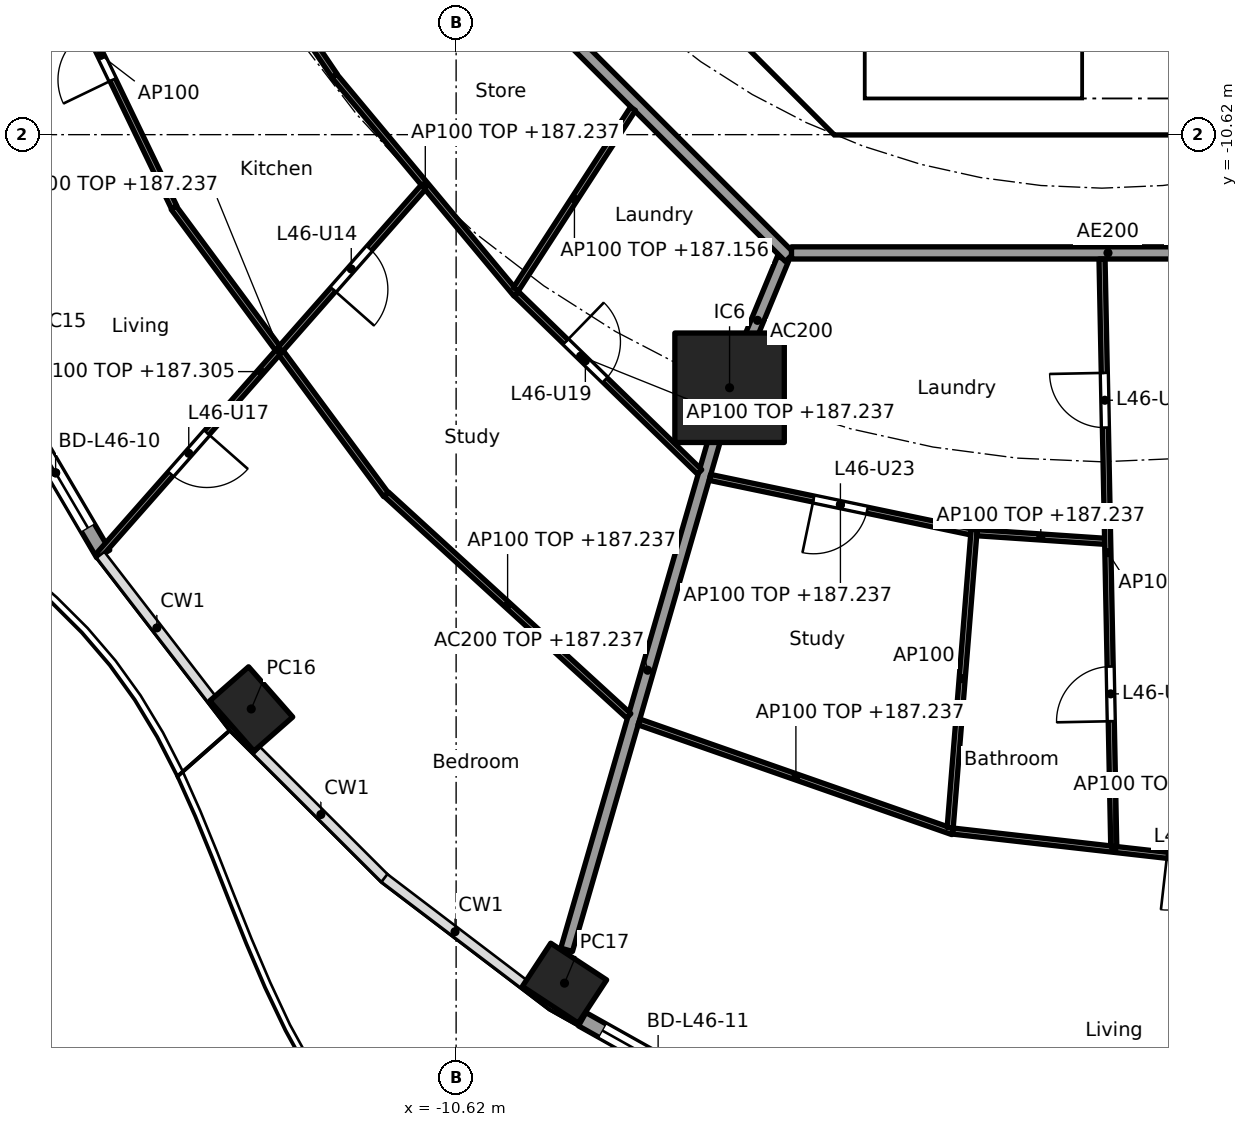
"""IFC4 building model, lengths in metres.
Left out: names, types, materials, properties, quantities, classifications, styles, units other than length and angle.
Written with IfcOpenShell. Run it as: python <this file> out.ifc"""

import sys

from ifc_helpers import new_model, si_unit, direction, frame, frame_2d, origin, origin_2d, place, context, subcontext, project, spatial, polyline, rectangle, hollow_rectangle, outline, extrude, element, fill, save


model = new_model("IFC4")
c1 = context("Model", 3, precision=1e-05, world=origin(), true_north=direction((0.0, 1.0)))
c2 = subcontext(c1, "Body", "Model", "MODEL_VIEW")
j1 = project(units=[si_unit("LENGTHUNIT", "METRE"), si_unit("PLANEANGLEUNIT", "RADIAN")], contexts=[c1])
p1 = place(None, origin())
s1 = spatial("IfcSite", under=j1, at=p1, CompositionType="ELEMENT")
p2 = place(p1, origin())
s2 = spatial("IfcBuilding", under=s1, at=p2, CompositionType="ELEMENT")
p3 = place(p2, frame((0.0, 0.0, 184.4)))
s3 = spatial("IfcBuildingStorey", under=s2, at=p3, CompositionType="ELEMENT", Elevation=184.4)
for number, where, z_axis, x_axis in (
    (1, (-13.989, -20.064, 0.0), (0.0, 0.0, 1.0), (0.66, -0.751, 0.0)),
    (2, (-8.837, -24.573, 0.0), (0.0, 0.0, 1.0), (0.836, -0.549, 0.0)),
):
    element("IfcColumn", number, at=place(p3, frame(where, z_axis=z_axis, x_axis=x_axis)), inside=s3, PredefinedType="COLUMN", context=c2, shape_type="SweptSolid", body=[
        extrude(hollow_rectangle(XDim=1.1, YDim=0.85, WallThickness=0.036, at=origin_2d()), origin(), (0.0, 0.0, 1.0), 3.7),
    ])
p4 = place(p3, frame((-6.123, -14.782, 0.0), z_axis=(0.0, 0.0, 1.0), x_axis=(1.0, 0.0, 0.0)))
e3 = element("IfcColumn", 3, at=p4, inside=s3, PredefinedType="COLUMN", context=c2, shape_type="SweptSolid", body=[
    extrude(rectangle(XDim=1.8, YDim=1.8, at=origin_2d()), origin(), (0.0, 0.0, 1.0), 3.7),
])
p5 = place(p3, frame((-16.424, -17.515, 0.0), z_axis=(0.0, 0.0, 1.0), x_axis=(-0.506309086483, 0.862352079458, 0.0)))
e4 = element("IfcWall", 4, at=p5, inside=s3, PredefinedType="SOLIDWALL", context=c2, shape_type="SweptSolid", body=[
    extrude(rectangle(XDim=3.092, YDim=0.25, at=frame_2d((1.546, 0.0))), origin(), (0.0, 0.0, 1.0), 3.44),
])
p6 = place(p5, frame((0.496, 0.0, 0.0)))
e5 = element("IfcOpeningElement", 5, at=p6, cuts=e4, PredefinedType="OPENING", context=c2, shape_type="SweptSolid", body=[
    extrude(rectangle(XDim=2.1, YDim=2.4, at=frame_2d((1.05, 1.2))), frame((0.0, 0.135, 0.0), z_axis=(0.0, -1.0, 0.0), x_axis=(1.0, 0.0, 0.0)), (0.0, 0.0, 1.0), 0.27),
])
p7 = place(p3, frame((-6.049, -26.568, 0.0), z_axis=(0.0, 0.0, 1.0), x_axis=(-0.872078262455, 0.489366431371, 0.0)))
e6 = element("IfcWall", 6, at=p7, inside=s3, PredefinedType="SOLIDWALL", context=c2, shape_type="SweptSolid", body=[
    extrude(rectangle(XDim=2.864, YDim=0.25, at=frame_2d((1.432, 0.0))), origin(), (0.0, 0.0, 1.0), 3.44),
])
p8 = place(p7, frame((0.382, 0.0, 0.0)))
e7 = element("IfcOpeningElement", 7, at=p8, cuts=e6, PredefinedType="OPENING", context=c2, shape_type="SweptSolid", body=[
    extrude(rectangle(XDim=2.1, YDim=2.4, at=frame_2d((1.05, 1.2))), frame((0.0, 0.135, 0.0), z_axis=(0.0, -1.0, 0.0), x_axis=(1.0, 0.0, 0.0)), (0.0, 0.0, 1.0), 0.27),
])
p9 = place(p3, frame((-9.988, -4.613, 0.0), z_axis=(0.0, 0.0, 1.0), x_axis=(0.707106781187, -0.707106781187, 0.0)))
e8 = element("IfcWall", 8, at=p9, inside=s3, PredefinedType="SHEAR", context=c2, shape_type="SweptSolid", body=[
    extrude(rectangle(XDim=7.602, YDim=0.6, at=frame_2d((3.801, 0.0))), origin(), (0.0, 0.0, 1.0), 3.44),
])
p10 = place(p9, frame((6.151, 0.0, 0.0)))
e9 = element("IfcOpeningElement", 9, at=p10, cuts=e8, PredefinedType="OPENING", context=c2, shape_type="SweptSolid", body=[
    extrude(rectangle(XDim=1.1, YDim=2.1, at=frame_2d((0.55, 1.05))), frame((0.0, 0.31, 0.0), z_axis=(0.0, -1.0, 0.0), x_axis=(1.0, 0.0, 0.0)), (0.0, 0.0, 1.0), 0.62),
])
p11 = place(p3, origin())
e10 = element("IfcWall", 10, at=p11, inside=s3, PredefinedType="SHEAR", context=c2, shape_type="SweptSolid", body=[
    extrude(outline(polyline([(-4.152, -10.025), (4.152, -10.025), (4.401, -9.776), (4.825, -10.2), (4.401, -10.625), (-4.401, -10.625), (-4.825, -10.2), (-4.401, -9.776), (-4.152, -10.025)])), origin(), (0.0, 0.0, 1.0), 3.44),
])
p12 = place(p3, origin())
e11 = element("IfcWall", 11, at=p12, inside=s3, PredefinedType="SOLIDWALL", context=c2, shape_type="SweptSolid", body=[
    extrude(outline(polyline([(-3.9, -10.025), (-4.1, -10.025), (-4.1, -7.025), (-3.9, -7.025), (-3.9, -10.025)])), origin(), (0.0, 0.0, 1.0), 3.44),
])
p13 = place(p3, frame((-5.243, -12.657, 0.0), z_axis=(0.0, 0.0, 1.0), x_axis=(-0.382707856524, -0.923869415315, 0.0)))
e12 = element("IfcWall", 12, at=p13, inside=s3, PredefinedType="PARTITIONING", context=c2, shape_type="SweptSolid", body=[
    extrude(rectangle(XDim=2.2, YDim=0.2, at=frame_2d((1.1, 0.0))), origin(), (0.0, 0.0, 1.0), 3.44),
])
p14 = place(p3, frame((-6.137, -14.83, 0.0), z_axis=(0.0, 0.0, 1.0), x_axis=(-0.278461169897, -0.96044748782, 0.0)))
e13 = element("IfcWall", 13, at=p14, inside=s3, PredefinedType="PARTITIONING", context=c2, shape_type="SweptSolid", body=[
    extrude(rectangle(XDim=9.573, YDim=0.2, at=frame_2d((4.787, 0.0))), origin(), (0.0, 0.0, 1.0), 2.837),
])
p15 = place(p3, frame((-12.635, -5.134, 0.0), z_axis=(0.0, 0.0, 1.0), x_axis=(0.707106781187, -0.707106781187, 0.0)))
e14 = element("IfcWall", 14, at=p15, inside=s3, PredefinedType="PARTITIONING", context=c2, shape_type="SweptSolid", body=[
    extrude(rectangle(XDim=10.609, YDim=0.2, at=frame_2d((5.305, 0.0))), origin(), (0.0, 0.0, 1.0), 3.44),
])
p16 = place(p3, frame((-5.104, -12.565, 0.0), z_axis=(0.0, 0.0, 1.0), x_axis=(1.0, 0.0, 0.0)))
e15 = element("IfcWall", 15, at=p16, inside=s3, PredefinedType="PARTITIONING", context=c2, shape_type="SweptSolid", body=[
    extrude(rectangle(XDim=10.409, YDim=0.2, at=frame_2d((5.205, 0.0))), origin(), (0.0, 0.0, 1.0), 3.44),
])
p17 = place(p16, frame((6.339, 0.0, 0.0)))
e16 = element("IfcOpeningElement", 16, at=p17, cuts=e15, PredefinedType="OPENING", context=c2, shape_type="SweptSolid", body=[
    extrude(rectangle(XDim=1.0, YDim=2.1, at=frame_2d((0.5, 1.05))), frame((0.0, 0.11, 0.0), z_axis=(0.0, -1.0, 0.0), x_axis=(1.0, 0.0, 0.0)), (0.0, 0.0, 1.0), 0.22),
])
p18 = place(p3, frame((-15.008, -6.125, 0.0), z_axis=(0.0, 0.0, 1.0), x_axis=(0.561073758086, -0.827765811076, 0.0)))
e17 = element("IfcWall", 17, at=p18, inside=s3, PredefinedType="PARTITIONING", context=c2, shape_type="SweptSolid", body=[
    extrude(rectangle(XDim=4.259, YDim=0.1, at=frame_2d((2.129, 0.0))), origin(), (0.0, 0.0, 1.0), 3.44),
])
p19 = place(p18, frame((1.704, 0.0, 0.0)))
e18 = element("IfcOpeningElement", 18, at=p19, cuts=e17, PredefinedType="OPENING", context=c2, shape_type="SweptSolid", body=[
    extrude(rectangle(XDim=0.9, YDim=2.1, at=frame_2d((0.45, 1.05))), frame((0.0, 0.06, 0.0), z_axis=(0.0, -1.0, 0.0), x_axis=(1.0, 0.0, 0.0)), (0.0, 0.0, 1.0), 0.12),
])
p20 = place(p3, frame((-17.669, -6.809, 0.0), z_axis=(0.0, 0.0, 1.0), x_axis=(0.434040130629, -0.900893536997, 0.0)))
e19 = element("IfcWall", 19, at=p20, inside=s3, PredefinedType="PARTITIONING", context=c2, shape_type="SweptSolid", body=[
    extrude(rectangle(XDim=5.558, YDim=0.1, at=frame_2d((2.779, 0.0))), origin(), (0.0, 0.0, 1.0), 3.44),
])
p21 = place(p20, frame((2.329, 0.0, 0.0)))
e20 = element("IfcOpeningElement", 20, at=p21, cuts=e19, PredefinedType="OPENING", context=c2, shape_type="SweptSolid", body=[
    extrude(rectangle(XDim=0.9, YDim=2.1, at=frame_2d((0.45, 1.05))), frame((0.0, 0.06, 0.0), z_axis=(0.0, -1.0, 0.0), x_axis=(1.0, 0.0, 0.0)), (0.0, 0.0, 1.0), 0.12),
])
p22 = place(p3, frame((-12.623, -9.653, 0.0), z_axis=(0.0, 0.0, 1.0), x_axis=(0.640297481347, -0.768127030758, 0.0)))
e21 = element("IfcWall", 21, at=p22, inside=s3, PredefinedType="PARTITIONING", context=c2, shape_type="SweptSolid", body=[
    extrude(rectangle(XDim=4.672, YDim=0.1, at=frame_2d((2.336, 0.0))), origin(), (0.0, 0.0, 1.0), 2.837),
])
p23 = place(p3, frame((-15.265, -11.821, 0.0), z_axis=(0.0, 0.0, 1.0), x_axis=(0.594711348772, -0.803939308432, 0.0)))
e22 = element("IfcWall", 22, at=p23, inside=s3, PredefinedType="PARTITIONING", context=c2, shape_type="SweptSolid", body=[
    extrude(rectangle(XDim=5.872, YDim=0.1, at=frame_2d((2.936, 0.0))), origin(), (0.0, 0.0, 1.0), 2.837),
])
p24 = place(p3, frame((-11.16, -11.485, 0.0), z_axis=(0.0, 0.0, 1.0), x_axis=(-0.661275898802, -0.750142776852, 0.0)))
e23 = element("IfcWall", 23, at=p24, inside=s3, PredefinedType="PARTITIONING", context=c2, shape_type="SweptSolid", body=[
    extrude(rectangle(XDim=8.083, YDim=0.1, at=frame_2d((4.041, 0.0))), origin(), (0.0, 0.0, 1.0), 2.905),
])
p25 = place(p24, frame((1.341, 0.0, 0.0)))
e24 = element("IfcOpeningElement", 24, at=p25, cuts=e23, PredefinedType="OPENING", context=c2, shape_type="SweptSolid", body=[
    extrude(rectangle(XDim=0.9, YDim=2.1, at=frame_2d((0.45, 1.05))), frame((0.0, 0.06, 0.0), z_axis=(0.0, -1.0, 0.0), x_axis=(1.0, 0.0, 0.0)), (0.0, 0.0, 1.0), 0.12),
])
p26 = place(p24, frame((5.382, 0.0, 0.0)))
e25 = element("IfcOpeningElement", 25, at=p26, cuts=e23, PredefinedType="OPENING", context=c2, shape_type="SweptSolid", body=[
    extrude(rectangle(XDim=0.9, YDim=2.1, at=frame_2d((0.45, 1.05))), frame((0.0, 0.06, 0.0), z_axis=(0.0, -1.0, 0.0), x_axis=(1.0, 0.0, 0.0)), (0.0, 0.0, 1.0), 0.12),
])
p27 = place(p3, frame((-7.712, -10.195, 0.0), z_axis=(0.0, 0.0, 1.0), x_axis=(-0.544170086001, -0.838974920663, 0.0)))
e26 = element("IfcWall", 26, at=p27, inside=s3, PredefinedType="PARTITIONING", context=c2, shape_type="SweptSolid", body=[
    extrude(rectangle(XDim=3.535, YDim=0.1, at=frame_2d((1.768, 0.0))), origin(), (0.0, 0.0, 1.0), 2.756),
])
p28 = place(p3, frame((-9.627, -13.238, 0.0), z_axis=(0.0, 0.0, 1.0), x_axis=(0.716919058692, -0.697156412352, 0.0)))
e27 = element("IfcWall", 27, at=p28, inside=s3, PredefinedType="PARTITIONING", context=c2, shape_type="SweptSolid", body=[
    extrude(rectangle(XDim=4.2, YDim=0.1, at=frame_2d((2.1, 0.0))), origin(), (0.0, 0.0, 1.0), 2.837),
])
p29 = place(p28, frame((1.13, 0.0, 0.0)))
e28 = element("IfcOpeningElement", 28, at=p29, cuts=e27, PredefinedType="OPENING", context=c2, shape_type="SweptSolid", body=[
    extrude(rectangle(XDim=0.9, YDim=2.1, at=frame_2d((0.45, 1.05))), frame((0.0, 0.06, 0.0), z_axis=(0.0, -1.0, 0.0), x_axis=(1.0, 0.0, 0.0)), (0.0, 0.0, 1.0), 0.12),
])
p30 = place(p3, frame((-11.766, -16.535, 0.0), z_axis=(0.0, 0.0, 1.0), x_axis=(0.73807320557, -0.674720640872, 0.0)))
e29 = element("IfcWall", 29, at=p30, inside=s3, PredefinedType="PARTITIONING", context=c2, shape_type="SweptSolid", body=[
    extrude(rectangle(XDim=5.399, YDim=0.1, at=frame_2d((2.699, 0.0))), origin(), (0.0, 0.0, 1.0), 2.837),
])
p31 = place(p3, frame((-6.447, -16.256, 0.0), z_axis=(0.0, 0.0, 1.0), x_axis=(0.978906251581, -0.204309937631, 0.0)))
e30 = element("IfcWall", 30, at=p31, inside=s3, PredefinedType="PARTITIONING", context=c2, shape_type="SweptSolid", body=[
    extrude(rectangle(XDim=4.385, YDim=0.1, at=frame_2d((2.193, 0.0))), origin(), (0.0, 0.0, 1.0), 2.837),
])
p32 = place(p31, frame((1.743, 0.0, 0.0)))
e31 = element("IfcOpeningElement", 31, at=p32, cuts=e30, PredefinedType="OPENING", context=c2, shape_type="SweptSolid", body=[
    extrude(rectangle(XDim=0.9, YDim=2.1, at=frame_2d((0.45, 1.05))), frame((0.0, 0.06, 0.0), z_axis=(0.0, -1.0, 0.0), x_axis=(1.0, 0.0, 0.0)), (0.0, 0.0, 1.0), 0.12),
])
p33 = place(p3, frame((-7.613, -20.278, 0.0), z_axis=(0.0, 0.0, 1.0), x_axis=(0.943918212431, -0.330179357684, 0.0)))
e32 = element("IfcWall", 32, at=p33, inside=s3, PredefinedType="PARTITIONING", context=c2, shape_type="SweptSolid", body=[
    extrude(rectangle(XDim=5.467, YDim=0.1, at=frame_2d((2.734, 0.0))), origin(), (0.0, 0.0, 1.0), 2.837),
])
p34 = place(p3, frame((-2.101, -17.113, 0.0), z_axis=(0.0, 0.0, 1.0), x_axis=(-0.080183022299, -0.996780157776, 0.0)))
e33 = element("IfcWall", 33, at=p34, inside=s3, PredefinedType="PARTITIONING", context=c2, shape_type="SweptSolid", body=[
    extrude(rectangle(XDim=4.92, YDim=0.1, at=frame_2d((2.46, 0.0))), origin(), (0.0, 0.0, 1.0), 3.44),
])
p35 = place(p3, frame((-2.055, -17.166, 0.0), z_axis=(0.0, 0.0, 1.0), x_axis=(0.997756833447, -0.06694252243, 0.0)))
e34 = element("IfcWall", 34, at=p35, inside=s3, PredefinedType="PARTITIONING", context=c2, shape_type="SweptSolid", body=[
    extrude(rectangle(XDim=2.104, YDim=0.1, at=frame_2d((1.052, 0.0))), origin(), (0.0, 0.0, 1.0), 2.837),
])
p36 = place(p3, frame((-2.449, -22.073, 0.0), z_axis=(0.0, 0.0, 1.0), x_axis=(0.993660315081, -0.112424099879, 0.0)))
e35 = element("IfcWall", 35, at=p36, inside=s3, PredefinedType="PARTITIONING", context=c2, shape_type="SweptSolid", body=[
    extrude(rectangle(XDim=5.325, YDim=0.1, at=frame_2d((2.662, 0.0))), origin(), (0.0, 0.0, 1.0), 2.837),
])
p37 = place(p36, frame((3.544, 0.0, 0.0)))
e36 = element("IfcOpeningElement", 36, at=p37, cuts=e35, PredefinedType="OPENING", context=c2, shape_type="SweptSolid", body=[
    extrude(rectangle(XDim=0.9, YDim=2.1, at=frame_2d((0.45, 1.05))), frame((0.0, 0.06, 0.0), z_axis=(0.0, -1.0, 0.0), x_axis=(1.0, 0.0, 0.0)), (0.0, 0.0, 1.0), 0.12),
])
p38 = place(p3, frame((0.002, -12.665, 0.0), z_axis=(0.0, 0.0, 1.0), x_axis=(0.019992969345, -0.999800120613, 0.0)))
e37 = element("IfcWall", 37, at=p38, inside=s3, PredefinedType="PARTITIONING", context=c2, shape_type="SweptSolid", body=[
    extrude(rectangle(XDim=9.659, YDim=0.1, at=frame_2d((4.83, 0.0))), origin(), (0.0, 0.0, 1.0), 2.756),
])
p39 = place(p38, frame((1.873, 0.0, 0.0)))
e38 = element("IfcOpeningElement", 38, at=p39, cuts=e37, PredefinedType="OPENING", context=c2, shape_type="SweptSolid", body=[
    extrude(rectangle(XDim=0.9, YDim=2.1, at=frame_2d((0.45, 1.05))), frame((0.0, 0.06, 0.0), z_axis=(0.0, -1.0, 0.0), x_axis=(1.0, 0.0, 0.0)), (0.0, 0.0, 1.0), 0.12),
])
p40 = place(p38, frame((6.703, 0.0, 0.0)))
e39 = element("IfcOpeningElement", 39, at=p40, cuts=e37, PredefinedType="OPENING", context=c2, shape_type="SweptSolid", body=[
    extrude(rectangle(XDim=0.9, YDim=2.1, at=frame_2d((0.45, 1.05))), frame((0.0, 0.06, 0.0), z_axis=(0.0, -1.0, 0.0), x_axis=(1.0, 0.0, 0.0)), (0.0, 0.0, 1.0), 0.12),
])
p41 = place(p6, origin())
e40 = element("IfcDoor", 40, at=p41, inside=s3, OperationType="SLIDING_TO_LEFT", PredefinedType="DOOR", context=c2, shape_type="SweptSolid", body=[
    extrude(rectangle(XDim=2.1, YDim=2.4, at=frame_2d((1.05, 1.2))), frame((0.0, 0.025, 0.0), z_axis=(0.0, -1.0, 0.0), x_axis=(1.0, 0.0, 0.0)), (0.0, 0.0, 1.0), 0.05),
])
fill(e5, e40)
p42 = place(p8, origin())
e41 = element("IfcDoor", 41, at=p42, inside=s3, OperationType="SLIDING_TO_LEFT", PredefinedType="DOOR", context=c2, shape_type="SweptSolid", body=[
    extrude(rectangle(XDim=2.1, YDim=2.4, at=frame_2d((1.05, 1.2))), frame((0.0, 0.025, 0.0), z_axis=(0.0, -1.0, 0.0), x_axis=(1.0, 0.0, 0.0)), (0.0, 0.0, 1.0), 0.05),
])
fill(e7, e41)
p43 = place(p10, origin())
e42 = element("IfcDoor", 42, at=p43, inside=s3, OperationType="SINGLE_SWING_RIGHT", PredefinedType="DOOR", context=c2, shape_type="SweptSolid", body=[
    extrude(rectangle(XDim=1.1, YDim=2.1, at=frame_2d((0.55, 1.05))), frame((0.0, 0.025, 0.0), z_axis=(0.0, -1.0, 0.0), x_axis=(1.0, 0.0, 0.0)), (0.0, 0.0, 1.0), 0.05),
])
fill(e9, e42)
p44 = place(p25, origin())
e43 = element("IfcDoor", 43, at=p44, inside=s3, OperationType="SINGLE_SWING_RIGHT", PredefinedType="DOOR", context=c2, shape_type="SweptSolid", body=[
    extrude(rectangle(XDim=0.9, YDim=2.1, at=frame_2d((0.45, 1.05))), frame((0.0, 0.025, 0.0), z_axis=(0.0, -1.0, 0.0), x_axis=(1.0, 0.0, 0.0)), (0.0, 0.0, 1.0), 0.05),
])
fill(e24, e43)
p45 = place(p21, frame((0.9, 0.0, 0.0), x_axis=(-1.0, 0.0, 0.0)))
e44 = element("IfcDoor", 44, at=p45, inside=s3, OperationType="SINGLE_SWING_LEFT", PredefinedType="DOOR", context=c2, shape_type="SweptSolid", body=[
    extrude(rectangle(XDim=0.9, YDim=2.1, at=frame_2d((0.45, 1.05))), frame((0.0, 0.025, 0.0), z_axis=(0.0, -1.0, 0.0), x_axis=(1.0, 0.0, 0.0)), (0.0, 0.0, 1.0), 0.05),
])
fill(e20, e44)
p46 = place(p26, origin())
e45 = element("IfcDoor", 45, at=p46, inside=s3, OperationType="SINGLE_SWING_LEFT", PredefinedType="DOOR", context=c2, shape_type="SweptSolid", body=[
    extrude(rectangle(XDim=0.9, YDim=2.1, at=frame_2d((0.45, 1.05))), frame((0.0, 0.025, 0.0), z_axis=(0.0, -1.0, 0.0), x_axis=(1.0, 0.0, 0.0)), (0.0, 0.0, 1.0), 0.05),
])
fill(e25, e45)
p47 = place(p29, origin())
e46 = element("IfcDoor", 46, at=p47, inside=s3, OperationType="SINGLE_SWING_LEFT", PredefinedType="DOOR", context=c2, shape_type="SweptSolid", body=[
    extrude(rectangle(XDim=0.9, YDim=2.1, at=frame_2d((0.45, 1.05))), frame((0.0, 0.025, 0.0), z_axis=(0.0, -1.0, 0.0), x_axis=(1.0, 0.0, 0.0)), (0.0, 0.0, 1.0), 0.05),
])
fill(e28, e46)
p48 = place(p39, frame((0.9, 0.0, 0.0), x_axis=(-1.0, 0.0, 0.0)))
e47 = element("IfcDoor", 47, at=p48, inside=s3, OperationType="SINGLE_SWING_RIGHT", PredefinedType="DOOR", context=c2, shape_type="SweptSolid", body=[
    extrude(rectangle(XDim=0.9, YDim=2.1, at=frame_2d((0.45, 1.05))), frame((0.0, 0.025, 0.0), z_axis=(0.0, -1.0, 0.0), x_axis=(1.0, 0.0, 0.0)), (0.0, 0.0, 1.0), 0.05),
])
fill(e38, e47)
p49 = place(p32, frame((0.9, 0.0, 0.0), x_axis=(-1.0, 0.0, 0.0)))
e48 = element("IfcDoor", 48, at=p49, inside=s3, OperationType="SINGLE_SWING_RIGHT", PredefinedType="DOOR", context=c2, shape_type="SweptSolid", body=[
    extrude(rectangle(XDim=0.9, YDim=2.1, at=frame_2d((0.45, 1.05))), frame((0.0, 0.025, 0.0), z_axis=(0.0, -1.0, 0.0), x_axis=(1.0, 0.0, 0.0)), (0.0, 0.0, 1.0), 0.05),
])
fill(e31, e48)
p50 = place(p40, frame((0.9, 0.0, 0.0), x_axis=(-1.0, 0.0, 0.0)))
e49 = element("IfcDoor", 49, at=p50, inside=s3, OperationType="SINGLE_SWING_LEFT", PredefinedType="DOOR", context=c2, shape_type="SweptSolid", body=[
    extrude(rectangle(XDim=0.9, YDim=2.1, at=frame_2d((0.45, 1.05))), frame((0.0, 0.025, 0.0), z_axis=(0.0, -1.0, 0.0), x_axis=(1.0, 0.0, 0.0)), (0.0, 0.0, 1.0), 0.05),
])
fill(e39, e49)
p51 = place(p37, frame((0.9, 0.0, 0.0), x_axis=(-1.0, 0.0, 0.0)))
e50 = element("IfcDoor", 50, at=p51, inside=s3, OperationType="SINGLE_SWING_RIGHT", PredefinedType="DOOR", context=c2, shape_type="SweptSolid", body=[
    extrude(rectangle(XDim=0.9, YDim=2.1, at=frame_2d((0.45, 1.05))), frame((0.0, 0.025, 0.0), z_axis=(0.0, -1.0, 0.0), x_axis=(1.0, 0.0, 0.0)), (0.0, 0.0, 1.0), 0.05),
])
fill(e36, e50)
save(model, sys.argv[1])
